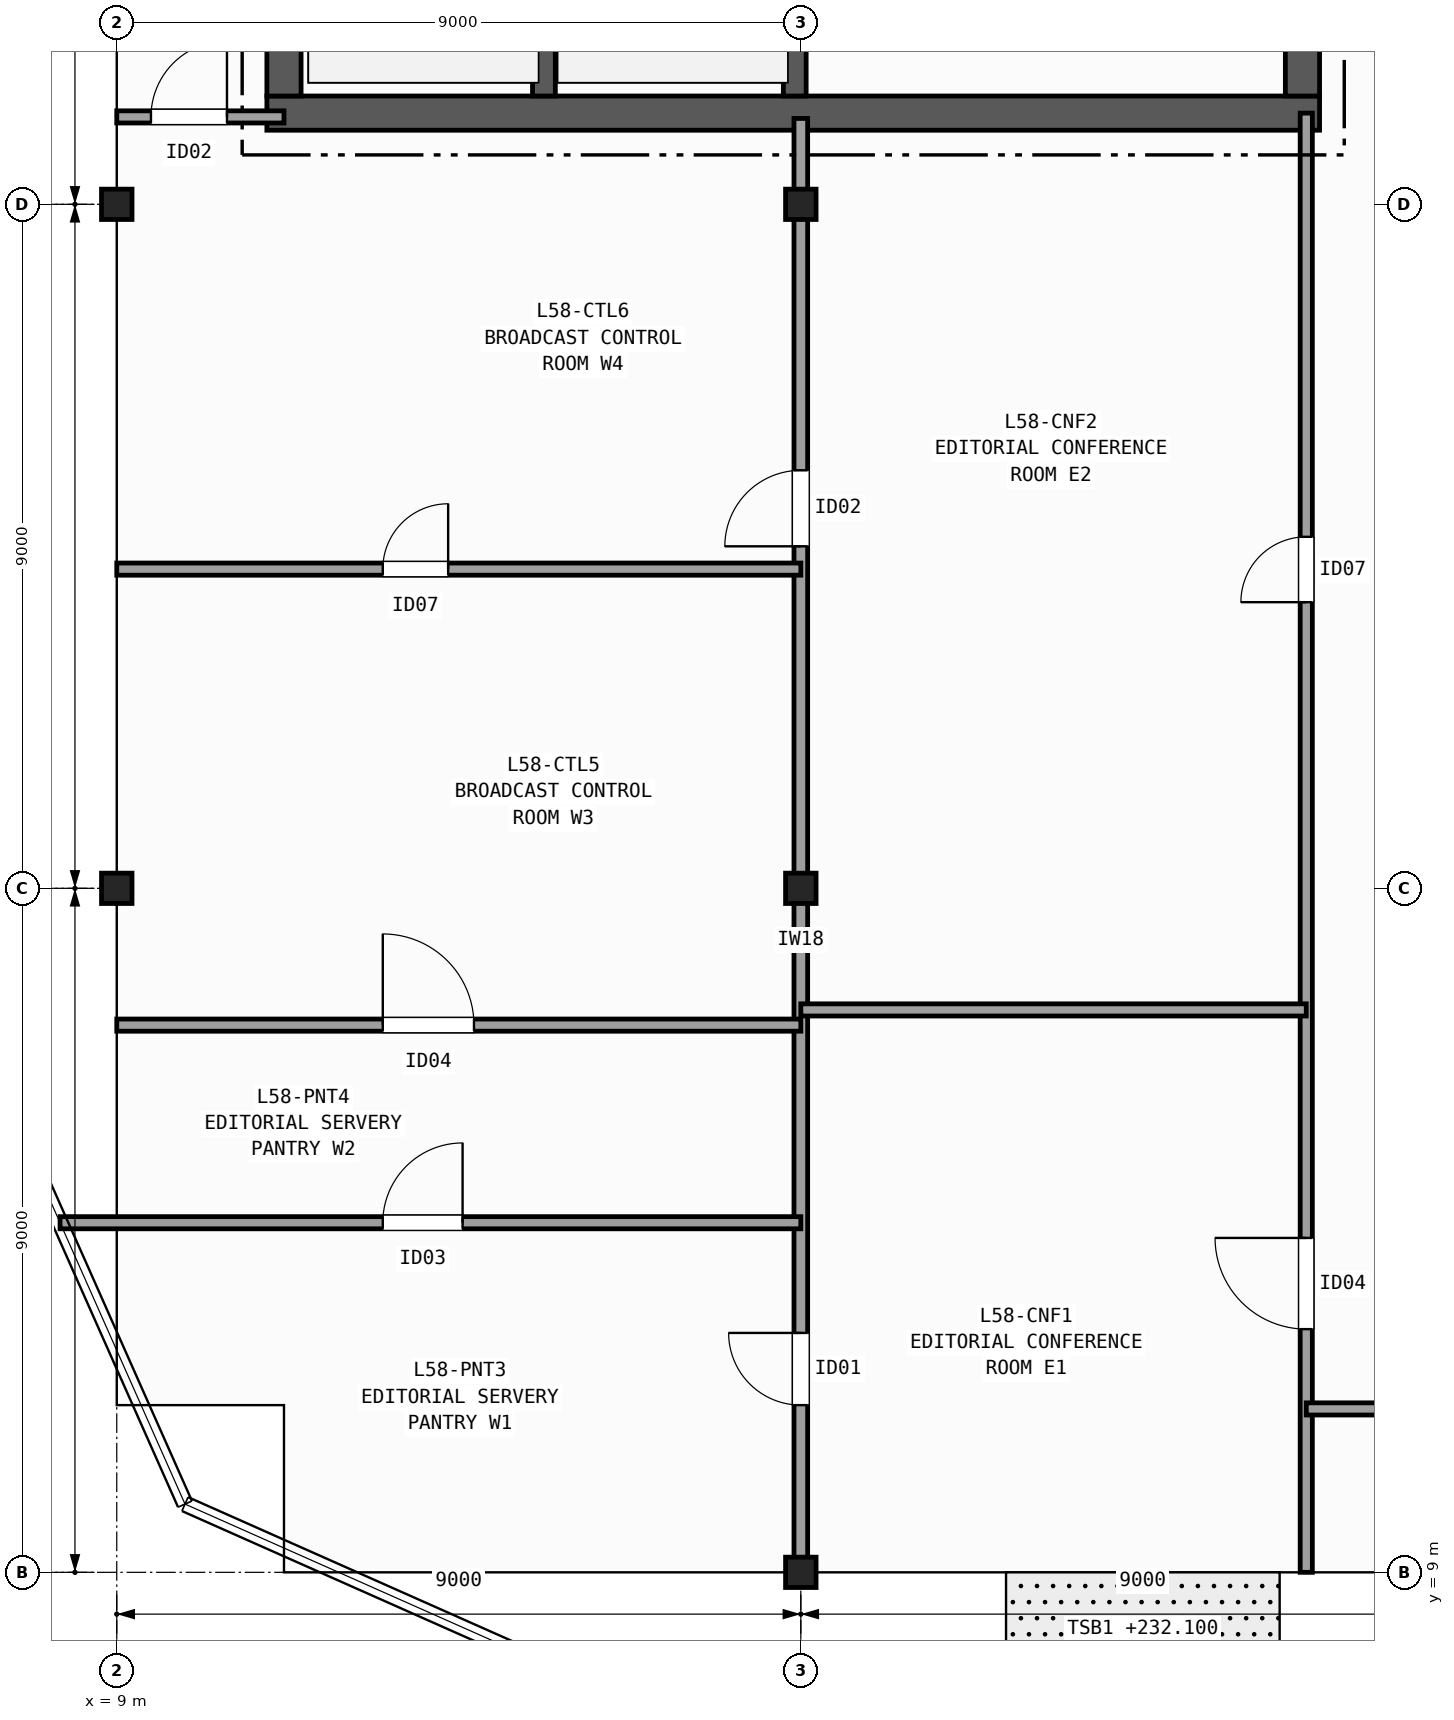
"""IFC4 building model, lengths in metres.
Left out: names, types, materials, properties, quantities, classifications, styles, units other than length and angle.
Written with IfcOpenShell. Run it as: python <this file> out.ifc"""

import sys

from ifc_helpers import new_model, si_unit, direction, frame, frame_2d, origin, origin_2d, place, context, subcontext, project, spatial, rectangle, i_section, extrude, element, fill, save


model = new_model("IFC4")
c1 = context("Model", 3, precision=1e-05, world=origin(), true_north=direction((0.0, 1.0)))
c2 = subcontext(c1, "Body", "Model", "MODEL_VIEW")
j1 = project(units=[si_unit("LENGTHUNIT", "METRE"), si_unit("PLANEANGLEUNIT", "RADIAN")], contexts=[c1])
p1 = place(None, origin())
s1 = spatial("IfcSite", under=j1, at=p1, CompositionType="ELEMENT")
p2 = place(p1, origin())
s2 = spatial("IfcBuilding", under=s1, at=p2, CompositionType="ELEMENT")
p3 = place(p2, frame((0.0, 0.0, 232.1)))
s3 = spatial("IfcBuildingStorey", under=s2, at=p3, CompositionType="ELEMENT", Elevation=232.1)
for number, where, z_axis, x_axis in (
    (1, (9.0, 18.0, 0.0), (0.0, 0.0, 1.0), (1.0, 0.0, 0.0)),
    (2, (9.0, 27.0, 0.0), (0.0, 0.0, 1.0), (1.0, 0.0, 0.0)),
    (3, (18.0, 9.0, 0.0), (0.0, 0.0, 1.0), (1.0, 0.0, 0.0)),
    (4, (18.0, 18.0, 0.0), (0.0, 0.0, 1.0), (1.0, 0.0, 0.0)),
    (5, (18.0, 27.0, 0.0), (0.0, 0.0, 1.0), (1.0, 0.0, 0.0)),
):
    element("IfcColumn", number, at=place(p3, frame(where, z_axis=z_axis, x_axis=x_axis)), inside=s3, PredefinedType="COLUMN", context=c2, shape_type="SweptSolid", body=[
        extrude(i_section(OverallWidth=0.401, OverallDepth=0.399, WebThickness=0.025, FlangeThickness=0.04, FilletRadius=0.015, at=origin_2d()), origin(), (0.0, 0.0, 1.0), 3.7),
    ])
p4 = place(p3, frame((10.975, 28.2, 0.0), z_axis=(0.0, 0.0, 1.0), x_axis=(1.0, 0.0, 0.0)))
e6 = element("IfcWall", 6, at=p4, inside=s3, PredefinedType="SHEAR", context=c2, shape_type="SweptSolid", body=[
    extrude(rectangle(XDim=13.85, YDim=0.45, at=frame_2d((6.925, 0.0))), origin(), (0.0, 0.0, 1.0), 3.37),
])
p5 = place(p3, frame((11.2, 42.175, 0.0), z_axis=(0.0, 0.0, 1.0), x_axis=(0.0, -1.0, 0.0)))
e7 = element("IfcWall", 7, at=p5, inside=s3, PredefinedType="SHEAR", context=c2, shape_type="SweptSolid", body=[
    extrude(rectangle(XDim=13.75, YDim=0.45, at=frame_2d((6.875, 0.0))), origin(), (0.0, 0.0, 1.0), 3.37),
])
p6 = place(p3, frame((24.6, 28.425, 0.0), z_axis=(0.0, 0.0, 1.0), x_axis=(0.0, 1.0, 0.0)))
e8 = element("IfcWall", 8, at=p6, inside=s3, PredefinedType="SHEAR", context=c2, shape_type="SweptSolid", body=[
    extrude(rectangle(XDim=13.75, YDim=0.45, at=frame_2d((6.875, 0.0))), origin(), (0.0, 0.0, 1.0), 3.37),
])
p7 = place(p6, frame((3.375, 0.0, 0.0)))
e9 = element("IfcOpeningElement", 9, at=p7, cuts=e8, PredefinedType="OPENING", context=c2, shape_type="SweptSolid", body=[
    extrude(rectangle(XDim=1.5, YDim=2.2, at=frame_2d((0.75, 1.1))), frame((0.0, 0.235, 0.0), z_axis=(0.0, -1.0, 0.0), x_axis=(1.0, 0.0, 0.0)), (0.0, 0.0, 1.0), 0.47),
])
p8 = place(p6, frame((9.975, 0.0, 0.0)))
e10 = element("IfcOpeningElement", 10, at=p8, cuts=e8, PredefinedType="OPENING", context=c2, shape_type="SweptSolid", body=[
    extrude(rectangle(XDim=0.9, YDim=2.1, at=frame_2d((0.45, 1.05))), frame((0.0, 0.235, 0.0), z_axis=(0.0, -1.0, 0.0), x_axis=(1.0, 0.0, 0.0)), (0.0, 0.0, 1.0), 0.47),
])
p9 = place(p6, frame((12.075, 0.0, 0.0)))
e11 = element("IfcOpeningElement", 11, at=p9, cuts=e8, PredefinedType="OPENING", context=c2, shape_type="SweptSolid", body=[
    extrude(rectangle(XDim=0.9, YDim=2.1, at=frame_2d((0.45, 1.05))), frame((0.0, 0.235, 0.0), z_axis=(0.0, -1.0, 0.0), x_axis=(1.0, 0.0, 0.0)), (0.0, 0.0, 1.0), 0.47),
])
p10 = place(p3, frame((14.62, 28.425, 0.0), z_axis=(0.0, 0.0, 1.0), x_axis=(0.0, 1.0, 0.0)))
e12 = element("IfcWall", 12, at=p10, inside=s3, PredefinedType="SHEAR", context=c2, shape_type="SweptSolid", body=[
    extrude(rectangle(XDim=9.025, YDim=0.3, at=frame_2d((4.512, 0.0))), origin(), (0.0, 0.0, 1.0), 3.37),
])
p11 = place(p3, frame((17.92, 42.175, 0.0), z_axis=(0.0, 0.0, 1.0), x_axis=(0.0, -1.0, 0.0)))
e13 = element("IfcWall", 13, at=p11, inside=s3, PredefinedType="SHEAR", context=c2, shape_type="SweptSolid", body=[
    extrude(rectangle(XDim=13.75, YDim=0.3, at=frame_2d((6.875, 0.0))), origin(), (0.0, 0.0, 1.0), 3.37),
])
p12 = place(p11, frame((2.0, 0.0, 0.0)))
e14 = element("IfcOpeningElement", 14, at=p12, cuts=e13, PredefinedType="OPENING", context=c2, shape_type="SweptSolid", body=[
    extrude(rectangle(XDim=1.15, YDim=2.15, at=frame_2d((0.575, 1.075))), frame((0.0, 0.16, 0.0), z_axis=(0.0, -1.0, 0.0), x_axis=(1.0, 0.0, 0.0)), (0.0, 0.0, 1.0), 0.32),
])
p13 = place(p3, frame((9.0, 28.15, 0.0), z_axis=(0.0, 0.0, 1.0), x_axis=(1.0, 0.0, 0.0)))
e15 = element("IfcWall", 15, at=p13, inside=s3, PredefinedType="PARTITIONING", context=c2, shape_type="SweptSolid", body=[
    extrude(rectangle(XDim=2.2, YDim=0.16, at=frame_2d((1.1, 0.0))), origin(), (0.0, 0.0, 1.0), 2.657),
])
p14 = place(p13, frame((0.45, 0.0, 0.0)))
e16 = element("IfcOpeningElement", 16, at=p14, cuts=e15, PredefinedType="OPENING", context=c2, shape_type="SweptSolid", body=[
    extrude(rectangle(XDim=1.0, YDim=2.1, at=frame_2d((0.5, 1.05))), frame((0.0, 0.09, 0.0), z_axis=(0.0, -1.0, 0.0), x_axis=(1.0, 0.0, 0.0)), (0.0, 0.0, 1.0), 0.18),
])
p15 = place(p3, frame((24.65, 9.0, 0.0), z_axis=(0.0, 0.0, 1.0), x_axis=(0.0, 1.0, 0.0)))
e17 = element("IfcWall", 17, at=p15, inside=s3, PredefinedType="PARTITIONING", context=c2, shape_type="SweptSolid", body=[
    extrude(rectangle(XDim=19.2, YDim=0.16, at=frame_2d((9.6, 0.0))), origin(), (0.0, 0.0, 1.0), 2.657),
])
p16 = place(p15, frame((3.2, 0.0, 0.0)))
e18 = element("IfcOpeningElement", 18, at=p16, cuts=e17, PredefinedType="OPENING", context=c2, shape_type="SweptSolid", body=[
    extrude(rectangle(XDim=1.2, YDim=2.15, at=frame_2d((0.6, 1.075))), frame((0.0, 0.09, 0.0), z_axis=(0.0, -1.0, 0.0), x_axis=(1.0, 0.0, 0.0)), (0.0, 0.0, 1.0), 0.18),
])
p17 = place(p15, frame((12.765, 0.0, 0.0)))
e19 = element("IfcOpeningElement", 19, at=p17, cuts=e17, PredefinedType="OPENING", context=c2, shape_type="SweptSolid", body=[
    extrude(rectangle(XDim=0.86, YDim=2.05, at=frame_2d((0.43, 1.025))), frame((0.0, 0.09, 0.0), z_axis=(0.0, -1.0, 0.0), x_axis=(1.0, 0.0, 0.0)), (0.0, 0.0, 1.0), 0.18),
])
p18 = place(p3, frame((18.0, 9.0, 0.0), z_axis=(0.0, 0.0, 1.0), x_axis=(0.0, 1.0, 0.0)))
e20 = element("IfcWall", 20, at=p18, inside=s3, PredefinedType="PARTITIONING", context=c2, shape_type="SweptSolid", body=[
    extrude(rectangle(XDim=19.13, YDim=0.18, at=frame_2d((9.565, 0.0))), origin(), (0.0, 0.0, 1.0), 2.657),
])
p19 = place(p18, frame((2.2, 0.0, 0.0)))
e21 = element("IfcOpeningElement", 21, at=p19, cuts=e20, PredefinedType="OPENING", context=c2, shape_type="SweptSolid", body=[
    extrude(rectangle(XDim=0.95, YDim=2.1, at=frame_2d((0.475, 1.05))), frame((0.0, 0.1, 0.0), z_axis=(0.0, -1.0, 0.0), x_axis=(1.0, 0.0, 0.0)), (0.0, 0.0, 1.0), 0.2),
])
p20 = place(p18, frame((13.5, 0.0, 0.0)))
e22 = element("IfcOpeningElement", 22, at=p20, cuts=e20, PredefinedType="OPENING", context=c2, shape_type="SweptSolid", body=[
    extrude(rectangle(XDim=1.0, YDim=2.1, at=frame_2d((0.5, 1.05))), frame((0.0, 0.1, 0.0), z_axis=(0.0, -1.0, 0.0), x_axis=(1.0, 0.0, 0.0)), (0.0, 0.0, 1.0), 0.2),
])
p21 = place(p3, frame((18.0, 16.4, 0.0), z_axis=(0.0, 0.0, 1.0), x_axis=(1.0, 0.0, 0.0)))
e23 = element("IfcWall", 23, at=p21, inside=s3, PredefinedType="PARTITIONING", context=c2, shape_type="SweptSolid", body=[
    extrude(rectangle(XDim=6.65, YDim=0.16, at=frame_2d((3.325, 0.0))), origin(), (0.0, 0.0, 1.0), 2.742),
])
p22 = place(p3, frame((8.254, 13.6, 0.0), z_axis=(0.0, 0.0, 1.0), x_axis=(1.0, 0.0, 0.0)))
e24 = element("IfcWall", 24, at=p22, inside=s3, PredefinedType="PARTITIONING", context=c2, shape_type="SweptSolid", body=[
    extrude(rectangle(XDim=9.746, YDim=0.16, at=frame_2d((4.873, 0.0))), origin(), (0.0, 0.0, 1.0), 2.742),
])
p23 = place(p22, frame((4.246, 0.0, 0.0)))
e25 = element("IfcOpeningElement", 25, at=p23, cuts=e24, PredefinedType="OPENING", context=c2, shape_type="SweptSolid", body=[
    extrude(rectangle(XDim=1.05, YDim=2.15, at=frame_2d((0.525, 1.075))), frame((0.0, 0.09, 0.0), z_axis=(0.0, -1.0, 0.0), x_axis=(1.0, 0.0, 0.0)), (0.0, 0.0, 1.0), 0.18),
])
p24 = place(p3, frame((9.0, 16.2, 0.0), z_axis=(0.0, 0.0, 1.0), x_axis=(1.0, 0.0, 0.0)))
e26 = element("IfcWall", 26, at=p24, inside=s3, PredefinedType="PARTITIONING", context=c2, shape_type="SweptSolid", body=[
    extrude(rectangle(XDim=9.0, YDim=0.16, at=frame_2d((4.5, 0.0))), origin(), (0.0, 0.0, 1.0), 2.742),
])
p25 = place(p24, frame((3.5, 0.0, 0.0)))
e27 = element("IfcOpeningElement", 27, at=p25, cuts=e26, PredefinedType="OPENING", context=c2, shape_type="SweptSolid", body=[
    extrude(rectangle(XDim=1.2, YDim=2.15, at=frame_2d((0.6, 1.075))), frame((0.0, 0.09, 0.0), z_axis=(0.0, -1.0, 0.0), x_axis=(1.0, 0.0, 0.0)), (0.0, 0.0, 1.0), 0.18),
])
p26 = place(p3, frame((9.0, 22.2, 0.0), z_axis=(0.0, 0.0, 1.0), x_axis=(1.0, 0.0, 0.0)))
e28 = element("IfcWall", 28, at=p26, inside=s3, PredefinedType="PARTITIONING", context=c2, shape_type="SweptSolid", body=[
    extrude(rectangle(XDim=9.0, YDim=0.16, at=frame_2d((4.5, 0.0))), origin(), (0.0, 0.0, 1.0), 2.657),
])
p27 = place(p26, frame((3.5, 0.0, 0.0)))
e29 = element("IfcOpeningElement", 29, at=p27, cuts=e28, PredefinedType="OPENING", context=c2, shape_type="SweptSolid", body=[
    extrude(rectangle(XDim=0.86, YDim=2.05, at=frame_2d((0.43, 1.025))), frame((0.0, 0.09, 0.0), z_axis=(0.0, -1.0, 0.0), x_axis=(1.0, 0.0, 0.0)), (0.0, 0.0, 1.0), 0.18),
])
p28 = place(p3, frame((24.65, 11.15, 0.0), z_axis=(0.0, 0.0, 1.0), x_axis=(1.0, 0.0, 0.0)))
e30 = element("IfcWall", 30, at=p28, inside=s3, PredefinedType="PARTITIONING", context=c2, shape_type="SweptSolid", body=[
    extrude(rectangle(XDim=4.75, YDim=0.16, at=frame_2d((2.375, 0.0))), origin(), (0.0, 0.0, 1.0), 2.742),
])
p29 = place(p28, frame((1.2, 0.0, 0.0)))
e31 = element("IfcOpeningElement", 31, at=p29, cuts=e30, PredefinedType="OPENING", context=c2, shape_type="SweptSolid", body=[
    extrude(rectangle(XDim=0.95, YDim=2.1, at=frame_2d((0.475, 1.05))), frame((0.0, 0.09, 0.0), z_axis=(0.0, -1.0, 0.0), x_axis=(1.0, 0.0, 0.0)), (0.0, 0.0, 1.0), 0.18),
])
p30 = place(p14, origin())
e32 = element("IfcDoor", 32, at=p30, inside=s3, OperationType="SINGLE_SWING_RIGHT", PredefinedType="DOOR", context=c2, shape_type="SweptSolid", body=[
    extrude(rectangle(XDim=1.0, YDim=2.1, at=frame_2d((0.5, 1.05))), frame((0.0, 0.025, 0.0), z_axis=(0.0, -1.0, 0.0), x_axis=(1.0, 0.0, 0.0)), (0.0, 0.0, 1.0), 0.05),
])
fill(e16, e32)
p31 = place(p16, origin())
e33 = element("IfcDoor", 33, at=p31, inside=s3, OperationType="SINGLE_SWING_RIGHT", PredefinedType="DOOR", context=c2, shape_type="SweptSolid", body=[
    extrude(rectangle(XDim=1.2, YDim=2.15, at=frame_2d((0.6, 1.075))), frame((0.0, 0.025, 0.0), z_axis=(0.0, -1.0, 0.0), x_axis=(1.0, 0.0, 0.0)), (0.0, 0.0, 1.0), 0.05),
])
fill(e18, e33)
p32 = place(p17, origin())
e34 = element("IfcDoor", 34, at=p32, inside=s3, OperationType="SINGLE_SWING_LEFT", PredefinedType="DOOR", context=c2, shape_type="SweptSolid", body=[
    extrude(rectangle(XDim=0.86, YDim=2.05, at=frame_2d((0.43, 1.025))), frame((0.0, 0.025, 0.0), z_axis=(0.0, -1.0, 0.0), x_axis=(1.0, 0.0, 0.0)), (0.0, 0.0, 1.0), 0.05),
])
fill(e19, e34)
p33 = place(p19, origin())
e35 = element("IfcDoor", 35, at=p33, inside=s3, OperationType="SINGLE_SWING_RIGHT", PredefinedType="DOOR", context=c2, shape_type="SweptSolid", body=[
    extrude(rectangle(XDim=0.95, YDim=2.1, at=frame_2d((0.475, 1.05))), frame((0.0, 0.025, 0.0), z_axis=(0.0, -1.0, 0.0), x_axis=(1.0, 0.0, 0.0)), (0.0, 0.0, 1.0), 0.05),
])
fill(e21, e35)
p34 = place(p20, origin())
e36 = element("IfcDoor", 36, at=p34, inside=s3, OperationType="SINGLE_SWING_LEFT", PredefinedType="DOOR", context=c2, shape_type="SweptSolid", body=[
    extrude(rectangle(XDim=1.0, YDim=2.1, at=frame_2d((0.5, 1.05))), frame((0.0, 0.025, 0.0), z_axis=(0.0, -1.0, 0.0), x_axis=(1.0, 0.0, 0.0)), (0.0, 0.0, 1.0), 0.05),
])
fill(e22, e36)
p35 = place(p23, origin())
e37 = element("IfcDoor", 37, at=p35, inside=s3, OperationType="SINGLE_SWING_RIGHT", PredefinedType="DOOR", context=c2, shape_type="SweptSolid", body=[
    extrude(rectangle(XDim=1.05, YDim=2.15, at=frame_2d((0.525, 1.075))), frame((0.0, 0.025, 0.0), z_axis=(0.0, -1.0, 0.0), x_axis=(1.0, 0.0, 0.0)), (0.0, 0.0, 1.0), 0.05),
])
fill(e25, e37)
p36 = place(p25, origin())
e38 = element("IfcDoor", 38, at=p36, inside=s3, OperationType="SINGLE_SWING_LEFT", PredefinedType="DOOR", context=c2, shape_type="SweptSolid", body=[
    extrude(rectangle(XDim=1.2, YDim=2.15, at=frame_2d((0.6, 1.075))), frame((0.0, 0.025, 0.0), z_axis=(0.0, -1.0, 0.0), x_axis=(1.0, 0.0, 0.0)), (0.0, 0.0, 1.0), 0.05),
])
fill(e27, e38)
p37 = place(p27, origin())
e39 = element("IfcDoor", 39, at=p37, inside=s3, OperationType="SINGLE_SWING_RIGHT", PredefinedType="DOOR", context=c2, shape_type="SweptSolid", body=[
    extrude(rectangle(XDim=0.86, YDim=2.05, at=frame_2d((0.43, 1.025))), frame((0.0, 0.025, 0.0), z_axis=(0.0, -1.0, 0.0), x_axis=(1.0, 0.0, 0.0)), (0.0, 0.0, 1.0), 0.05),
])
fill(e29, e39)
save(model, sys.argv[1])
